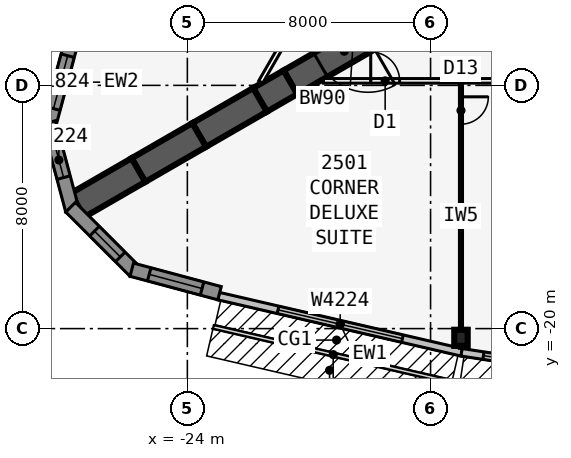
"""IFC4 building model, lengths in metres.
Left out: names, types, materials, properties, quantities, classifications, styles, units other than length and angle.
Written with IfcOpenShell. Run it as: python <this file> out.ifc"""

import sys

from ifc_helpers import new_model, si_unit, direction, frame, frame_2d, origin, origin_2d, place, context, subcontext, project, spatial, polyline, rectangle, i_section, outline, extrude, element, fill, save


model = new_model("IFC4")
c1 = context("Model", 3, precision=1e-05, world=origin(), true_north=direction((0.0, 1.0)))
c2 = subcontext(c1, "Body", "Model", "MODEL_VIEW")
j1 = project(units=[si_unit("LENGTHUNIT", "METRE"), si_unit("PLANEANGLEUNIT", "RADIAN")], contexts=[c1])
p1 = place(None, origin())
s1 = spatial("IfcSite", under=j1, at=p1, CompositionType="ELEMENT")
p2 = place(p1, origin())
s2 = spatial("IfcBuilding", under=s1, at=p2, CompositionType="ELEMENT")
p3 = place(p2, frame((0.0, 0.0, 96.5)))
s3 = spatial("IfcBuildingStorey", under=s2, at=p3, CompositionType="ELEMENT", Elevation=96.5)
p4 = place(p3, frame((-16.5, -9.526, 0.0), z_axis=(0.0, 0.0, 1.0), x_axis=(-0.866031398331, -0.499989616998, 0.0)))
e1 = element("IfcWall", 1, at=p4, inside=s3, PredefinedType="SHEAR", context=c2, shape_type="SweptSolid", body=[
    extrude(rectangle(XDim=4.746, YDim=0.9, at=frame_2d((2.373, 0.0))), origin(), (0.0, 0.0, 1.0), 3.4),
])
p5 = place(p4, frame((1.8, 0.0, 0.0)))
e2 = element("IfcOpeningElement", 2, at=p5, cuts=e1, PredefinedType="OPENING", context=c2, shape_type="SweptSolid", body=[
    extrude(rectangle(XDim=1.8, YDim=2.13, at=frame_2d((0.9, 1.065))), frame((0.0, 0.46, 0.0), z_axis=(0.0, -1.0, 0.0), x_axis=(1.0, 0.0, 0.0)), (0.0, 0.0, 1.0), 0.92),
])
p6 = place(p3, frame((-20.61, -11.899, 0.0), z_axis=(0.0, 0.0, 1.0), x_axis=(-0.866009537788, -0.500027479704, 0.0)))
e3 = element("IfcWall", 3, at=p6, inside=s3, PredefinedType="SHEAR", context=c2, shape_type="SweptSolid", body=[
    extrude(rectangle(XDim=1.155, YDim=0.9, at=frame_2d((0.577, 0.0))), origin(), (0.0, 0.0, 1.0), 3.4),
])
for number, where, z_axis, x_axis in (
    (4, (-21.61, -12.477, 0.0), (0.0, 0.0, 1.0), (-0.866, -0.5, 0.0)),
    (5, (-23.61, -13.631, 0.0), (0.0, 0.0, 1.0), (-0.866, -0.5, 0.0)),
    (6, (-25.61, -14.786, 0.0), (0.0, 0.0, 1.0), (-0.866, -0.5, 0.0)),
):
    element("IfcWall", number, at=place(p3, frame(where, z_axis=z_axis, x_axis=x_axis)), inside=s3, PredefinedType="SHEAR", context=c2, shape_type="SweptSolid", body=[
        extrude(rectangle(XDim=2.309, YDim=0.9, at=frame_2d((1.155, 0.0))), origin(), (0.0, 0.0, 1.0), 3.4),
    ])
p7 = place(p3, frame((-15.0, -20.303, 0.0), z_axis=(0.0, 0.0, 1.0), x_axis=(1.0, 0.0, 0.0)))
e7 = element("IfcColumn", 7, at=p7, inside=s3, PredefinedType="COLUMN", context=c2, shape_type="SweptSolid", body=[
    extrude(i_section(OverallWidth=0.442, OverallDepth=0.531, WebThickness=0.066, FlangeThickness=0.106, at=origin_2d()), origin(), (0.0, 0.0, 1.0), 3.4),
])
p8 = place(p3, frame((-22.972, -18.931, 0.0), z_axis=(0.0, 0.0, 1.0), x_axis=(0.974279327392, -0.225343720163, 0.0)))
e8 = element("IfcWall", 8, at=p8, inside=s3, PredefinedType="STANDARD", context=c2, shape_type="SweptSolid", body=[
    extrude(rectangle(XDim=8.211, YDim=0.25, at=frame_2d((4.105, 0.0))), origin(), (0.0, 0.0, 1.0), 3.235),
])
p9 = place(p8, frame((2.006, 0.0, 0.45)))
e9 = element("IfcOpeningElement", 9, at=p9, cuts=e8, PredefinedType="OPENING", context=c2, shape_type="SweptSolid", body=[
    extrude(rectangle(XDim=4.2, YDim=2.4, at=frame_2d((2.1, 1.2))), frame((0.0, 0.135, 0.0), z_axis=(0.0, -1.0, 0.0), x_axis=(1.0, 0.0, 0.0)), (0.0, 0.0, 1.0), 0.27),
])
p10 = place(p3, frame((-14.981, -20.779, 0.0), z_axis=(0.0, 0.0, 1.0), x_axis=(0.988615403399, -0.150464561152, 0.0)))
e10 = element("IfcWall", 10, at=p10, inside=s3, PredefinedType="STANDARD", context=c2, shape_type="SweptSolid", body=[
    extrude(rectangle(XDim=5.058, YDim=0.25, at=frame_2d((2.529, 0.0))), origin(), (0.0, 0.0, 1.0), 3.235),
])
p11 = place(p10, frame((0.729, 0.0, 0.45)))
e11 = element("IfcOpeningElement", 11, at=p11, cuts=e10, PredefinedType="OPENING", context=c2, shape_type="SweptSolid", body=[
    extrude(rectangle(XDim=3.6, YDim=2.4, at=frame_2d((1.8, 1.2))), frame((0.0, 0.135, 0.0), z_axis=(0.0, -1.0, 0.0), x_axis=(1.0, 0.0, 0.0)), (0.0, 0.0, 1.0), 0.27),
])
p12 = place(p3, frame((-27.783, -10.45, 0.0), z_axis=(0.0, 0.0, 1.0), x_axis=(-0.258780998834, -0.965936019953, 0.0)))
e12 = element("IfcWall", 12, at=p12, inside=s3, PredefinedType="SOLIDWALL", context=c2, shape_type="SweptSolid", body=[
    extrude(rectangle(XDim=2.989, YDim=0.45, at=frame_2d((1.494, 0.0))), origin(), (0.0, 0.0, 1.0), 3.235),
])
p13 = place(p12, frame((0.594, 0.0, 0.45)))
e13 = element("IfcOpeningElement", 13, at=p13, cuts=e12, PredefinedType="OPENING", context=c2, shape_type="SweptSolid", body=[
    extrude(rectangle(XDim=1.8, YDim=2.4, at=frame_2d((0.9, 1.2))), frame((0.0, 0.235, 0.0), z_axis=(0.0, -1.0, 0.0), x_axis=(1.0, 0.0, 0.0)), (0.0, 0.0, 1.0), 0.47),
])
p14 = place(p3, frame((-28.556, -13.221, 0.0), z_axis=(0.0, 0.0, 1.0), x_axis=(0.258801419081, -0.965930548995, 0.0)))
e14 = element("IfcWall", 14, at=p14, inside=s3, PredefinedType="SOLIDWALL", context=c2, shape_type="SweptSolid", body=[
    extrude(outline(polyline([(2.989, 0.225), (2.929, 0.225), (2.437, 0.093), (2.402, 0.225), (0.0, 0.225), (0.0, -0.225), (2.989, -0.225), (2.989, 0.225)])), origin(), (0.0, 0.0, 1.0), 3.235),
])
p15 = place(p14, frame((0.676, 0.0, 0.45)))
e15 = element("IfcOpeningElement", 15, at=p15, cuts=e14, PredefinedType="OPENING", context=c2, shape_type="SweptSolid", body=[
    extrude(rectangle(XDim=1.2, YDim=2.4, at=frame_2d((0.6, 1.2))), frame((0.0, 0.235, 0.0), z_axis=(0.0, -1.0, 0.0), x_axis=(1.0, 0.0, 0.0)), (0.0, 0.0, 1.0), 0.47),
])
p16 = place(p3, frame((-27.841, -16.007, 0.0), z_axis=(0.0, 0.0, 1.0), x_axis=(0.707025086683, -0.707188466253, 0.0)))
e16 = element("IfcWall", 16, at=p16, inside=s3, PredefinedType="SOLIDWALL", context=c2, shape_type="SweptSolid", body=[
    extrude(outline(polyline([(2.989, 0.225), (0.586, 0.225), (0.551, 0.093), (0.059, 0.225), (0.0, 0.225), (0.0, -0.225), (2.989, -0.225), (2.989, 0.225)])), origin(), (0.0, 0.0, 1.0), 3.235),
])
p17 = place(p16, frame((1.113, 0.0, 0.45)))
e17 = element("IfcOpeningElement", 17, at=p17, cuts=e16, PredefinedType="OPENING", context=c2, shape_type="SweptSolid", body=[
    extrude(rectangle(XDim=1.2, YDim=2.4, at=frame_2d((0.6, 1.2))), frame((0.0, 0.235, 0.0), z_axis=(0.0, -1.0, 0.0), x_axis=(1.0, 0.0, 0.0)), (0.0, 0.0, 1.0), 0.47),
])
p18 = place(p3, frame((-25.829, -18.062, 0.0), z_axis=(0.0, 0.0, 1.0), x_axis=(0.965930548995, -0.258801419081, 0.0)))
e18 = element("IfcWall", 18, at=p18, inside=s3, PredefinedType="SOLIDWALL", context=c2, shape_type="SweptSolid", body=[
    extrude(rectangle(XDim=2.989, YDim=0.45, at=frame_2d((1.494, 0.0))), origin(), (0.0, 0.0, 1.0), 3.235),
])
p19 = place(p18, frame((0.594, 0.0, 0.45)))
e19 = element("IfcOpeningElement", 19, at=p19, cuts=e18, PredefinedType="OPENING", context=c2, shape_type="SweptSolid", body=[
    extrude(rectangle(XDim=1.8, YDim=2.4, at=frame_2d((0.9, 1.2))), frame((0.0, 0.235, 0.0), z_axis=(0.0, -1.0, 0.0), x_axis=(1.0, 0.0, 0.0)), (0.0, 0.0, 1.0), 0.47),
])
p20 = place(p3, frame((-19.527, -11.851, 0.0), z_axis=(0.0, 0.0, 1.0), x_axis=(1.0, 0.0, 0.0)))
e20 = element("IfcWall", 20, at=p20, inside=s3, PredefinedType="PARTITIONING", context=c2, shape_type="SweptSolid", body=[
    extrude(rectangle(XDim=39.054, YDim=0.15, at=frame_2d((19.527, 0.0))), origin(), (0.0, 0.0, 1.0), 3.235),
])
p21 = place(p20, frame((1.558, 0.0, 0.0)))
e21 = element("IfcOpeningElement", 21, at=p21, cuts=e20, PredefinedType="OPENING", context=c2, shape_type="SweptSolid", body=[
    extrude(rectangle(XDim=0.95, YDim=2.13, at=frame_2d((0.475, 1.065))), frame((0.0, 0.085, 0.0), z_axis=(0.0, -1.0, 0.0), x_axis=(1.0, 0.0, 0.0)), (0.0, 0.0, 1.0), 0.17),
])
p22 = place(p20, frame((11.552, 0.0, 0.0)))
e22 = element("IfcOpeningElement", 22, at=p22, cuts=e20, PredefinedType="OPENING", context=c2, shape_type="SweptSolid", body=[
    extrude(rectangle(XDim=0.95, YDim=2.13, at=frame_2d((0.475, 1.065))), frame((0.0, 0.085, 0.0), z_axis=(0.0, -1.0, 0.0), x_axis=(1.0, 0.0, 0.0)), (0.0, 0.0, 1.0), 0.17),
])
p23 = place(p20, frame((21.527, 0.0, 0.0)))
e23 = element("IfcOpeningElement", 23, at=p23, cuts=e20, PredefinedType="OPENING", context=c2, shape_type="SweptSolid", body=[
    extrude(rectangle(XDim=1.0, YDim=2.13, at=frame_2d((0.5, 1.065))), frame((0.0, 0.085, 0.0), z_axis=(0.0, -1.0, 0.0), x_axis=(1.0, 0.0, 0.0)), (0.0, 0.0, 1.0), 0.17),
])
p24 = place(p20, frame((26.552, 0.0, 0.0)))
e24 = element("IfcOpeningElement", 24, at=p24, cuts=e20, PredefinedType="OPENING", context=c2, shape_type="SweptSolid", body=[
    extrude(rectangle(XDim=0.95, YDim=2.13, at=frame_2d((0.475, 1.065))), frame((0.0, 0.085, 0.0), z_axis=(0.0, -1.0, 0.0), x_axis=(1.0, 0.0, 0.0)), (0.0, 0.0, 1.0), 0.17),
])
p25 = place(p20, frame((37.752, 0.0, 0.0)))
e25 = element("IfcOpeningElement", 25, at=p25, cuts=e20, PredefinedType="OPENING", context=c2, shape_type="SweptSolid", body=[
    extrude(rectangle(XDim=0.95, YDim=2.13, at=frame_2d((0.475, 1.065))), frame((0.0, 0.085, 0.0), z_axis=(0.0, -1.0, 0.0), x_axis=(1.0, 0.0, 0.0)), (0.0, 0.0, 1.0), 0.17),
])
p26 = place(p3, frame((-15.0, -11.926, 0.0), z_axis=(0.0, 0.0, 1.0), x_axis=(0.0, -1.0, 0.0)))
e26 = element("IfcWall", 26, at=p26, inside=s3, PredefinedType="PARTITIONING", context=c2, shape_type="SweptSolid", body=[
    extrude(rectangle(XDim=8.72, YDim=0.1, at=frame_2d((4.36, 0.0))), origin(), (0.0, 0.0, 1.0), 2.389),
])
p27 = place(p26, frame((0.45, 0.0, 0.0)))
e27 = element("IfcOpeningElement", 27, at=p27, cuts=e26, PredefinedType="OPENING", context=c2, shape_type="SweptSolid", body=[
    extrude(rectangle(XDim=0.9, YDim=2.13, at=frame_2d((0.45, 1.065))), frame((0.0, 0.06, 0.0), z_axis=(0.0, -1.0, 0.0), x_axis=(1.0, 0.0, 0.0)), (0.0, 0.0, 1.0), 0.12),
])
p28 = place(p3, frame((-0.5, 24.636, 0.0), z_axis=(0.0, 0.0, 1.0), x_axis=(-0.500001915564, -0.86602429783, 0.0)))
e28 = element("IfcWall", 28, at=p28, inside=s3, PredefinedType="PARTITIONING", context=c2, shape_type="SweptSolid", body=[
    extrude(rectangle(XDim=42.172, YDim=0.15, at=frame_2d((21.086, 0.0))), origin(), (0.0, 0.0, 1.0), 3.235),
])
p29 = place(p28, frame((1.911, 0.0, 0.0)))
e29 = element("IfcOpeningElement", 29, at=p29, cuts=e28, PredefinedType="OPENING", context=c2, shape_type="SweptSolid", body=[
    extrude(rectangle(XDim=0.95, YDim=2.13, at=frame_2d((0.475, 1.065))), frame((0.0, 0.085, 0.0), z_axis=(0.0, -1.0, 0.0), x_axis=(1.0, 0.0, 0.0)), (0.0, 0.0, 1.0), 0.17),
])
p30 = place(p28, frame((8.111, 0.0, 0.0)))
e30 = element("IfcOpeningElement", 30, at=p30, cuts=e28, PredefinedType="OPENING", context=c2, shape_type="SweptSolid", body=[
    extrude(rectangle(XDim=0.95, YDim=2.13, at=frame_2d((0.475, 1.065))), frame((0.0, 0.085, 0.0), z_axis=(0.0, -1.0, 0.0), x_axis=(1.0, 0.0, 0.0)), (0.0, 0.0, 1.0), 0.17),
])
p31 = place(p28, frame((18.111, 0.0, 0.0)))
e31 = element("IfcOpeningElement", 31, at=p31, cuts=e28, PredefinedType="OPENING", context=c2, shape_type="SweptSolid", body=[
    extrude(rectangle(XDim=0.95, YDim=2.13, at=frame_2d((0.475, 1.065))), frame((0.0, 0.085, 0.0), z_axis=(0.0, -1.0, 0.0), x_axis=(1.0, 0.0, 0.0)), (0.0, 0.0, 1.0), 0.17),
])
p32 = place(p28, frame((28.711, 0.0, 0.0)))
e32 = element("IfcOpeningElement", 32, at=p32, cuts=e28, PredefinedType="OPENING", context=c2, shape_type="SweptSolid", body=[
    extrude(rectangle(XDim=0.95, YDim=2.13, at=frame_2d((0.475, 1.065))), frame((0.0, 0.085, 0.0), z_axis=(0.0, -1.0, 0.0), x_axis=(1.0, 0.0, 0.0)), (0.0, 0.0, 1.0), 0.17),
])
p33 = place(p28, frame((33.711, 0.0, 0.0)))
e33 = element("IfcOpeningElement", 33, at=p33, cuts=e28, PredefinedType="OPENING", context=c2, shape_type="SweptSolid", body=[
    extrude(rectangle(XDim=0.95, YDim=2.13, at=frame_2d((0.475, 1.065))), frame((0.0, 0.085, 0.0), z_axis=(0.0, -1.0, 0.0), x_axis=(1.0, 0.0, 0.0)), (0.0, 0.0, 1.0), 0.17),
])
p34 = place(p28, frame((39.311, 0.0, 0.0)))
e34 = element("IfcOpeningElement", 34, at=p34, cuts=e28, PredefinedType="OPENING", context=c2, shape_type="SweptSolid", body=[
    extrude(rectangle(XDim=0.95, YDim=2.13, at=frame_2d((0.475, 1.065))), frame((0.0, 0.085, 0.0), z_axis=(0.0, -1.0, 0.0), x_axis=(1.0, 0.0, 0.0)), (0.0, 0.0, 1.0), 0.17),
])
p35 = place(p9, origin())
e35 = element("IfcWindow", 35, at=p35, inside=s3, PartitioningType="SINGLE_PANEL", PredefinedType="WINDOW", context=c2, shape_type="SweptSolid", body=[
    extrude(rectangle(XDim=4.2, YDim=2.4, at=frame_2d((2.1, 1.2))), frame((0.0, 0.03, 0.0), z_axis=(0.0, -1.0, 0.0), x_axis=(1.0, 0.0, 0.0)), (0.0, 0.0, 1.0), 0.06),
])
fill(e9, e35)
p36 = place(p11, origin())
e36 = element("IfcWindow", 36, at=p36, inside=s3, PartitioningType="SINGLE_PANEL", PredefinedType="WINDOW", context=c2, shape_type="SweptSolid", body=[
    extrude(rectangle(XDim=3.6, YDim=2.4, at=frame_2d((1.8, 1.2))), frame((0.0, 0.03, 0.0), z_axis=(0.0, -1.0, 0.0), x_axis=(1.0, 0.0, 0.0)), (0.0, 0.0, 1.0), 0.06),
])
fill(e11, e36)
p37 = place(p13, origin())
e37 = element("IfcWindow", 37, at=p37, inside=s3, PartitioningType="SINGLE_PANEL", PredefinedType="WINDOW", context=c2, shape_type="SweptSolid", body=[
    extrude(rectangle(XDim=1.8, YDim=2.4, at=frame_2d((0.9, 1.2))), frame((0.0, 0.03, 0.0), z_axis=(0.0, -1.0, 0.0), x_axis=(1.0, 0.0, 0.0)), (0.0, 0.0, 1.0), 0.06),
])
fill(e13, e37)
p38 = place(p15, origin())
e38 = element("IfcWindow", 38, at=p38, inside=s3, PartitioningType="SINGLE_PANEL", PredefinedType="WINDOW", context=c2, shape_type="SweptSolid", body=[
    extrude(rectangle(XDim=1.2, YDim=2.4, at=frame_2d((0.6, 1.2))), frame((0.0, 0.03, 0.0), z_axis=(0.0, -1.0, 0.0), x_axis=(1.0, 0.0, 0.0)), (0.0, 0.0, 1.0), 0.06),
])
fill(e15, e38)
p39 = place(p17, origin())
e39 = element("IfcWindow", 39, at=p39, inside=s3, PartitioningType="SINGLE_PANEL", PredefinedType="WINDOW", context=c2, shape_type="SweptSolid", body=[
    extrude(rectangle(XDim=1.2, YDim=2.4, at=frame_2d((0.6, 1.2))), frame((0.0, 0.03, 0.0), z_axis=(0.0, -1.0, 0.0), x_axis=(1.0, 0.0, 0.0)), (0.0, 0.0, 1.0), 0.06),
])
fill(e17, e39)
p40 = place(p19, origin())
e40 = element("IfcWindow", 40, at=p40, inside=s3, PartitioningType="SINGLE_PANEL", PredefinedType="WINDOW", context=c2, shape_type="SweptSolid", body=[
    extrude(rectangle(XDim=1.8, YDim=2.4, at=frame_2d((0.9, 1.2))), frame((0.0, 0.03, 0.0), z_axis=(0.0, -1.0, 0.0), x_axis=(1.0, 0.0, 0.0)), (0.0, 0.0, 1.0), 0.06),
])
fill(e19, e40)
p41 = place(p27, origin())
e41 = element("IfcDoor", 41, at=p41, inside=s3, OperationType="SINGLE_SWING_LEFT", PredefinedType="DOOR", context=c2, shape_type="SweptSolid", body=[
    extrude(rectangle(XDim=0.9, YDim=2.13, at=frame_2d((0.45, 1.065))), frame((0.0, 0.025, 0.0), z_axis=(0.0, -1.0, 0.0), x_axis=(1.0, 0.0, 0.0)), (0.0, 0.0, 1.0), 0.05),
])
fill(e27, e41)
p42 = place(p21, origin())
e42 = element("IfcDoor", 42, at=p42, inside=s3, OperationType="SINGLE_SWING_LEFT", PredefinedType="DOOR", context=c2, shape_type="SweptSolid", body=[
    extrude(rectangle(XDim=0.95, YDim=2.13, at=frame_2d((0.475, 1.065))), frame((0.0, 0.025, 0.0), z_axis=(0.0, -1.0, 0.0), x_axis=(1.0, 0.0, 0.0)), (0.0, 0.0, 1.0), 0.05),
])
fill(e21, e42)
p43 = place(p5, origin())
e43 = element("IfcDoor", 43, at=p43, inside=s3, OperationType="DOUBLE_DOOR_DOUBLE_SWING", PredefinedType="DOOR", context=c2, shape_type="SweptSolid", body=[
    extrude(rectangle(XDim=1.8, YDim=2.13, at=frame_2d((0.9, 1.065))), frame((0.0, 0.025, 0.0), z_axis=(0.0, -1.0, 0.0), x_axis=(1.0, 0.0, 0.0)), (0.0, 0.0, 1.0), 0.05),
])
fill(e2, e43)
save(model, sys.argv[1])
